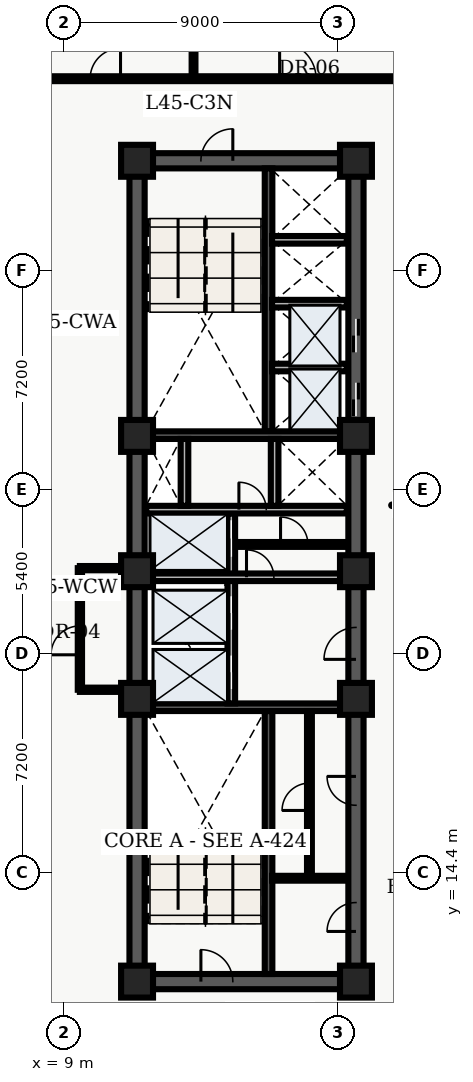
"""IFC4 building model, lengths in metres.
Left out: names, types, materials, properties, quantities, classifications, styles, units other than length and angle.
Written with IfcOpenShell. Run it as: python <this file> out.ifc"""

import sys

from ifc_helpers import new_model, entity, si_unit, converted_unit, direction, frame, origin_with_axes, origin_2d_with_axis, place, context, subcontext, project, spatial, polyline, rectangle, outline, extrude, element, fill, save


model = new_model("IFC4")
c1 = context("Model", 3, precision=1e-05, world=origin_with_axes(), true_north=direction((0.0, 1.0)))
c2 = subcontext(c1, "Body", "Model", "MODEL_VIEW")
j1 = project(units=[si_unit("LENGTHUNIT", "METRE"), converted_unit("PLANEANGLEUNIT", "DEGREE", entity("IfcPlaneAngleMeasure", 0.017), si_unit("PLANEANGLEUNIT", "RADIAN"), dimensions=[0, 0, 0, 0, 0, 0, 0])], contexts=[c1])
p1 = place(None, origin_with_axes())
s1 = spatial("IfcSite", under=j1, at=p1, CompositionType="ELEMENT")
p2 = place(p1, origin_with_axes())
s2 = spatial("IfcBuilding", under=s1, at=p2, CompositionType="ELEMENT")
p3 = place(p2, frame((0.0, 0.0, 183.6), z_axis=(0.0, 0.0, 1.0), x_axis=(1.0, 0.0, 0.0)))
s3 = spatial("IfcBuildingStorey", under=s2, at=p3, CompositionType="ELEMENT", Elevation=183.6)
p4 = place(p3, frame((11.4, 10.8, 0.0), z_axis=(0.0, 0.0, 1.0), x_axis=(0.0, 1.0, 0.0)))
e1 = element("IfcWall", 1, at=p4, inside=s3, PredefinedType="SHEAR", context=c2, shape_type="SweptSolid", body=[
    extrude(outline(polyline([(0.0, -0.25), (27.0, -0.25), (27.0, 0.25), (0.0, 0.25), (0.0, -0.25)])), origin_with_axes(), (0.0, 0.0, 1.0), 3.6),
])
p5 = place(p3, frame((11.4, 10.8, 0.0), z_axis=(0.0, 0.0, 1.0), x_axis=(1.0, 0.0, 0.0)))
e2 = element("IfcWall", 2, at=p5, inside=s3, PredefinedType="SHEAR", context=c2, shape_type="SweptSolid", body=[
    extrude(outline(polyline([(0.0, -0.25), (7.2, -0.25), (7.2, 0.25), (0.0, 0.25), (0.0, -0.25)])), origin_with_axes(), (0.0, 0.0, 1.0), 3.6),
])
p6 = place(p5, frame((2.625, 0.0, 0.0), z_axis=(0.0, 0.0, 1.0), x_axis=(1.0, 0.0, 0.0)))
e3 = element("IfcOpeningElement", 3, at=p6, cuts=e2, PredefinedType="OPENING", context=c2, shape_type="SweptSolid", body=[
    extrude(rectangle(XDim=1.05, YDim=0.52, at=origin_2d_with_axis()), origin_with_axes(), (0.0, 0.0, 1.0), 2.15),
])
p7 = place(p3, frame((11.4, 37.8, 0.0), z_axis=(0.0, 0.0, 1.0), x_axis=(1.0, 0.0, 0.0)))
e4 = element("IfcWall", 4, at=p7, inside=s3, PredefinedType="SHEAR", context=c2, shape_type="SweptSolid", body=[
    extrude(outline(polyline([(0.0, -0.25), (7.2, -0.25), (7.2, 0.25), (0.0, 0.25), (0.0, -0.25)])), origin_with_axes(), (0.0, 0.0, 1.0), 3.6),
])
p8 = place(p7, frame((2.625, 0.0, 0.0), z_axis=(0.0, 0.0, 1.0), x_axis=(1.0, 0.0, 0.0)))
e5 = element("IfcOpeningElement", 5, at=p8, cuts=e4, PredefinedType="OPENING", context=c2, shape_type="SweptSolid", body=[
    extrude(rectangle(XDim=1.05, YDim=0.52, at=origin_2d_with_axis()), origin_with_axes(), (0.0, 0.0, 1.0), 2.15),
])
p9 = place(p3, frame((18.6, 10.8, 0.0), z_axis=(0.0, 0.0, 1.0), x_axis=(0.0, 1.0, 0.0)))
e6 = element("IfcWall", 6, at=p9, inside=s3, PredefinedType="SHEAR", context=c2, shape_type="SweptSolid", body=[
    extrude(outline(polyline([(0.0, -0.25), (13.5, -0.25), (13.5, 0.25), (0.0, 0.25), (0.0, -0.25)])), origin_with_axes(), (0.0, 0.0, 1.0), 3.6),
])
p10 = place(p9, frame((11.125, 0.0, 0.0), z_axis=(0.0, 0.0, 1.0), x_axis=(1.0, 0.0, 0.0)))
e7 = element("IfcOpeningElement", 7, at=p10, cuts=e6, PredefinedType="OPENING", context=c2, shape_type="SweptSolid", body=[
    extrude(rectangle(XDim=1.05, YDim=0.52, at=origin_2d_with_axis()), origin_with_axes(), (0.0, 0.0, 1.0), 2.15),
])
p11 = place(p9, frame((2.125, 0.0, 0.0), z_axis=(0.0, 0.0, 1.0), x_axis=(1.0, 0.0, 0.0)))
e8 = element("IfcOpeningElement", 8, at=p11, cuts=e6, PredefinedType="OPENING", context=c2, shape_type="SweptSolid", body=[
    extrude(rectangle(XDim=0.95, YDim=0.52, at=origin_2d_with_axis()), origin_with_axes(), (0.0, 0.0, 1.0), 2.15),
])
p12 = place(p9, frame((6.275, 0.0, 0.0), z_axis=(0.0, 0.0, 1.0), x_axis=(1.0, 0.0, 0.0)))
e9 = element("IfcOpeningElement", 9, at=p12, cuts=e6, PredefinedType="OPENING", context=c2, shape_type="SweptSolid", body=[
    extrude(rectangle(XDim=0.95, YDim=0.52, at=origin_2d_with_axis()), origin_with_axes(), (0.0, 0.0, 1.0), 2.15),
])
p13 = place(p3, frame((18.6, 24.3, 0.0), z_axis=(0.0, 0.0, 1.0), x_axis=(0.0, 1.0, 0.0)))
e10 = element("IfcWall", 10, at=p13, inside=s3, PredefinedType="SHEAR", context=c2, shape_type="SweptSolid", body=[
    extrude(outline(polyline([(0.0, -0.25), (13.5, -0.25), (13.5, 0.25), (0.0, 0.25), (0.0, -0.25)])), origin_with_axes(), (0.0, 0.0, 1.0), 3.6),
])
p14 = place(p13, frame((5.65, 0.0, 0.0), z_axis=(0.0, 0.0, 1.0), x_axis=(1.0, 0.0, 0.0)))
e11 = element("IfcOpeningElement", 11, at=p14, cuts=e10, PredefinedType="OPENING", context=c2, shape_type="SweptSolid", body=[
    extrude(rectangle(XDim=1.1, YDim=0.52, at=origin_2d_with_axis()), origin_with_axes(), (0.0, 0.0, 1.0), 2.15),
])
p15 = place(p13, frame((7.75, 0.0, 0.0), z_axis=(0.0, 0.0, 1.0), x_axis=(1.0, 0.0, 0.0)))
e12 = element("IfcOpeningElement", 12, at=p15, cuts=e10, PredefinedType="OPENING", context=c2, shape_type="SweptSolid", body=[
    extrude(rectangle(XDim=1.1, YDim=0.52, at=origin_2d_with_axis()), origin_with_axes(), (0.0, 0.0, 1.0), 2.15),
])
p16 = place(p3, frame((15.725, 11.05, 0.0), z_axis=(0.0, 0.0, 1.0), x_axis=(0.0, 1.0, 0.0)))
e13 = element("IfcWall", 13, at=p16, inside=s3, PredefinedType="SHEAR", context=c2, shape_type="SweptSolid", body=[
    extrude(outline(polyline([(0.0, -0.125), (8.65, -0.125), (8.65, 0.125), (0.0, 0.125), (0.0, -0.125)])), origin_with_axes(), (0.0, 0.0, 1.0), 3.6),
])
p17 = place(p3, frame((11.65, 19.825, 0.0), z_axis=(0.0, 0.0, 1.0), x_axis=(1.0, 0.0, 0.0)))
e14 = element("IfcWall", 14, at=p17, inside=s3, PredefinedType="SHEAR", context=c2, shape_type="SweptSolid", body=[
    extrude(outline(polyline([(0.0, -0.125), (6.7, -0.125), (6.7, 0.125), (0.0, 0.125), (0.0, -0.125)])), origin_with_axes(), (0.0, 0.0, 1.0), 3.6),
])
p18 = place(p3, frame((15.725, 28.9, 0.0), z_axis=(0.0, 0.0, 1.0), x_axis=(0.0, 1.0, 0.0)))
e15 = element("IfcWall", 15, at=p18, inside=s3, PredefinedType="SHEAR", context=c2, shape_type="SweptSolid", body=[
    extrude(outline(polyline([(0.0, -0.125), (8.65, -0.125), (8.65, 0.125), (0.0, 0.125), (0.0, -0.125)])), origin_with_axes(), (0.0, 0.0, 1.0), 3.6),
])
p19 = place(p3, frame((11.65, 28.775, 0.0), z_axis=(0.0, 0.0, 1.0), x_axis=(1.0, 0.0, 0.0)))
e16 = element("IfcWall", 16, at=p19, inside=s3, PredefinedType="SHEAR", context=c2, shape_type="SweptSolid", body=[
    extrude(outline(polyline([(0.0, -0.125), (6.7, -0.125), (6.7, 0.125), (0.0, 0.125), (0.0, -0.125)])), origin_with_axes(), (0.0, 0.0, 1.0), 3.6),
])
p20 = place(p3, frame((14.5, 19.95, 0.0), z_axis=(0.0, 0.0, 1.0), x_axis=(0.0, 1.0, 0.0)))
e17 = element("IfcWall", 17, at=p20, inside=s3, PredefinedType="SOLIDWALL", context=c2, shape_type="SweptSolid", body=[
    extrude(outline(polyline([(0.0, -0.125), (6.25, -0.125), (6.25, 0.125), (0.0, 0.125), (0.0, -0.125)])), origin_with_axes(), (0.0, 0.0, 1.0), 2.64),
])
p21 = place(p20, frame((1.025, 0.0, 0.0), z_axis=(0.0, 0.0, 1.0), x_axis=(1.0, 0.0, 0.0)))
e18 = element("IfcOpeningElement", 18, at=p21, cuts=e17, PredefinedType="OPENING", context=c2, shape_type="SweptSolid", body=[
    extrude(rectangle(XDim=1.1, YDim=0.27, at=origin_2d_with_axis()), origin_with_axes(), (0.0, 0.0, 1.0), 2.15),
])
p22 = place(p20, frame((2.975, 0.0, 0.0), z_axis=(0.0, 0.0, 1.0), x_axis=(1.0, 0.0, 0.0)))
e19 = element("IfcOpeningElement", 19, at=p22, cuts=e17, PredefinedType="OPENING", context=c2, shape_type="SweptSolid", body=[
    extrude(rectangle(XDim=1.1, YDim=0.27, at=origin_2d_with_axis()), origin_with_axes(), (0.0, 0.0, 1.0), 2.15),
])
p23 = place(p20, frame((5.425, 0.0, 0.0), z_axis=(0.0, 0.0, 1.0), x_axis=(1.0, 0.0, 0.0)))
e20 = element("IfcOpeningElement", 20, at=p23, cuts=e17, PredefinedType="OPENING", context=c2, shape_type="SweptSolid", body=[
    extrude(rectangle(XDim=1.2, YDim=0.27, at=origin_2d_with_axis()), origin_with_axes(), (0.0, 0.0, 1.0), 2.15),
])
p24 = place(p3, frame((11.7, 24.1, 0.0), z_axis=(0.0, 0.0, 1.0), x_axis=(1.0, 0.0, 0.0)))
e21 = element("IfcWall", 21, at=p24, inside=s3, PredefinedType="SOLIDWALL", context=c2, shape_type="SweptSolid", body=[
    extrude(outline(polyline([(0.0, -0.125), (6.6, -0.125), (6.6, 0.125), (0.0, 0.125), (0.0, -0.125)])), origin_with_axes(), (0.0, 0.0, 1.0), 2.64),
])
p25 = place(p24, frame((3.75, 0.0, 0.0), z_axis=(0.0, 0.0, 1.0), x_axis=(1.0, 0.0, 0.0)))
e22 = element("IfcOpeningElement", 22, at=p25, cuts=e21, PredefinedType="OPENING", context=c2, shape_type="SweptSolid", body=[
    extrude(rectangle(XDim=0.9, YDim=0.27, at=origin_2d_with_axis()), origin_with_axes(), (0.0, 0.0, 1.0), 2.15),
])
p26 = place(p3, frame((11.7, 26.325, 0.0), z_axis=(0.0, 0.0, 1.0), x_axis=(1.0, 0.0, 0.0)))
e23 = element("IfcWall", 23, at=p26, inside=s3, PredefinedType="SOLIDWALL", context=c2, shape_type="SweptSolid", body=[
    extrude(outline(polyline([(0.0, -0.125), (6.6, -0.125), (6.6, 0.125), (0.0, 0.125), (0.0, -0.125)])), origin_with_axes(), (0.0, 0.0, 1.0), 2.64),
])
p27 = place(p26, frame((3.5, 0.0, 0.0), z_axis=(0.0, 0.0, 1.0), x_axis=(1.0, 0.0, 0.0)))
e24 = element("IfcOpeningElement", 24, at=p27, cuts=e23, PredefinedType="OPENING", context=c2, shape_type="SweptSolid", body=[
    extrude(rectangle(XDim=0.9, YDim=0.27, at=origin_2d_with_axis()), origin_with_axes(), (0.0, 0.0, 1.0), 2.15),
])
for number, where, z_axis, x_axis in (
    (25, (12.96, 26.45, 0.0), (0.0, 0.0, 1.0), (0.0, 1.0, 0.0)),
    (26, (15.925, 26.45, 0.0), (0.0, 0.0, 1.0), (0.0, 1.0, 0.0)),
):
    element("IfcWall", number, at=place(p3, frame(where, z_axis=z_axis, x_axis=x_axis)), inside=s3, PredefinedType="SOLIDWALL", context=c2, shape_type="SweptSolid", body=[
        extrude(outline(polyline([(0.0, -0.125), (2.2, -0.125), (2.2, 0.125), (0.0, 0.125), (0.0, -0.125)])), origin_with_axes(), (0.0, 0.0, 1.0), 2.64),
    ])
for number, where, z_axis, x_axis in (
    (27, (11.4, 10.8, 0.0), (0.0, 0.0, 1.0), (1.0, 0.0, 0.0)),
    (28, (11.4, 20.1, 0.0), (0.0, 0.0, 1.0), (1.0, 0.0, 0.0)),
    (29, (11.4, 24.3, 0.0), (0.0, 0.0, 1.0), (1.0, 0.0, 0.0)),
    (30, (11.4, 28.75, 0.0), (0.0, 0.0, 1.0), (1.0, 0.0, 0.0)),
    (31, (11.4, 37.8, 0.0), (0.0, 0.0, 1.0), (1.0, 0.0, 0.0)),
    (32, (18.6, 10.8, 0.0), (0.0, 0.0, 1.0), (1.0, 0.0, 0.0)),
    (33, (18.6, 20.1, 0.0), (0.0, 0.0, 1.0), (1.0, 0.0, 0.0)),
    (34, (18.6, 24.3, 0.0), (0.0, 0.0, 1.0), (1.0, 0.0, 0.0)),
    (35, (18.6, 28.75, 0.0), (0.0, 0.0, 1.0), (1.0, 0.0, 0.0)),
    (36, (18.6, 37.8, 0.0), (0.0, 0.0, 1.0), (1.0, 0.0, 0.0)),
):
    element("IfcColumn", number, at=place(p3, frame(where, z_axis=z_axis, x_axis=x_axis)), inside=s3, PredefinedType="COLUMN", context=c2, shape_type="SweptSolid", body=[
        extrude(rectangle(XDim=1.05, YDim=1.05, at=origin_2d_with_axis()), origin_with_axes(), (0.0, 0.0, 1.0), 3.9),
    ])
p28 = place(p3, frame((14.62, 25.18, 0.0), z_axis=(0.0, 0.0, 1.0), x_axis=(1.0, 0.0, 0.0)))
e37 = element("IfcWall", 37, at=p28, inside=s3, PredefinedType="PARTITIONING", context=c2, shape_type="SweptSolid", body=[
    extrude(outline(polyline([(0.0, -0.08), (3.68, -0.08), (3.68, 0.08), (0.0, 0.08), (0.0, -0.08)])), origin_with_axes(), (0.0, 0.0, 1.0), 2.64),
])
p29 = place(p28, frame((1.95, 0.0, 0.0), z_axis=(0.0, 0.0, 1.0), x_axis=(1.0, 0.0, 0.0)))
e38 = element("IfcOpeningElement", 38, at=p29, cuts=e37, PredefinedType="OPENING", context=c2, shape_type="SweptSolid", body=[
    extrude(rectangle(XDim=0.9, YDim=0.18, at=origin_2d_with_axis()), origin_with_axes(), (0.0, 0.0, 1.0), 2.15),
])
p30 = place(p3, frame((15.84, 14.2, 0.0), z_axis=(0.0, 0.0, 1.0), x_axis=(1.0, 0.0, 0.0)))
e39 = element("IfcWall", 39, at=p30, inside=s3, PredefinedType="PARTITIONING", context=c2, shape_type="SweptSolid", body=[
    extrude(outline(polyline([(0.0, -0.08), (2.46, -0.08), (2.46, 0.08), (0.0, 0.08), (0.0, -0.08)])), origin_with_axes(), (0.0, 0.0, 1.0), 2.64),
])
p31 = place(p3, frame((17.07, 14.28, 0.0), z_axis=(0.0, 0.0, 1.0), x_axis=(0.0, 1.0, 0.0)))
e40 = element("IfcWall", 40, at=p31, inside=s3, PredefinedType="PARTITIONING", context=c2, shape_type="SweptSolid", body=[
    extrude(outline(polyline([(0.0, -0.08), (5.42, -0.08), (5.42, 0.08), (0.0, 0.08), (0.0, -0.08)])), origin_with_axes(), (0.0, 0.0, 1.0), 2.64),
])
p32 = place(p31, frame((2.6, 0.0, 0.0), z_axis=(0.0, 0.0, 1.0), x_axis=(1.0, 0.0, 0.0)))
e41 = element("IfcOpeningElement", 41, at=p32, cuts=e40, PredefinedType="OPENING", context=c2, shape_type="SweptSolid", body=[
    extrude(rectangle(XDim=0.9, YDim=0.18, at=origin_2d_with_axis()), origin_with_axes(), (0.0, 0.0, 1.0), 2.15),
])
for number, where, z_axis, x_axis in (
    (42, (15.84, 31.0, 0.0), (0.0, 0.0, 1.0), (1.0, 0.0, 0.0)),
    (43, (15.84, 33.1, 0.0), (0.0, 0.0, 1.0), (1.0, 0.0, 0.0)),
    (44, (15.84, 35.2, 0.0), (0.0, 0.0, 1.0), (1.0, 0.0, 0.0)),
):
    element("IfcWall", number, at=place(p3, frame(where, z_axis=z_axis, x_axis=x_axis)), inside=s3, PredefinedType="SOLIDWALL", context=c2, shape_type="SweptSolid", body=[
        extrude(outline(polyline([(0.0, -0.125), (2.46, -0.125), (2.46, 0.125), (0.0, 0.125), (0.0, -0.125)])), origin_with_axes(), (0.0, 0.0, 1.0), 2.64),
    ])
p33 = place(p3, frame((9.52, 20.4, 0.0), z_axis=(0.0, 0.0, 1.0), x_axis=(0.0, 1.0, 0.0)))
e45 = element("IfcWall", 45, at=p33, inside=s3, PredefinedType="PARTITIONING", context=c2, shape_type="SweptSolid", body=[
    extrude(outline(polyline([(0.0, -0.07), (4.0, -0.07), (4.0, 0.07), (0.0, 0.07), (0.0, -0.07)])), origin_with_axes(), (0.0, 0.0, 1.0), 2.64),
])
p34 = place(p33, frame((1.625, 0.0, 0.0), z_axis=(0.0, 0.0, 1.0), x_axis=(1.0, 0.0, 0.0)))
e46 = element("IfcOpeningElement", 46, at=p34, cuts=e45, PredefinedType="OPENING", context=c2, shape_type="SweptSolid", body=[
    extrude(rectangle(XDim=0.95, YDim=0.16, at=origin_2d_with_axis()), origin_with_axes(), (0.0, 0.0, 1.0), 2.15),
])
for number, where, z_axis, x_axis in (
    (47, (9.52, 20.4, 0.0), (0.0, 0.0, 1.0), (1.0, 0.0, 0.0)),
    (48, (9.52, 24.4, 0.0), (0.0, 0.0, 1.0), (1.0, 0.0, 0.0)),
):
    element("IfcWall", number, at=place(p3, frame(where, z_axis=z_axis, x_axis=x_axis)), inside=s3, PredefinedType="PARTITIONING", context=c2, shape_type="SweptSolid", body=[
        extrude(outline(polyline([(0.0, -0.07), (1.58, -0.07), (1.58, 0.07), (0.0, 0.07), (0.0, -0.07)])), origin_with_axes(), (0.0, 0.0, 1.0), 2.64),
    ])
p35 = place(p3, frame((2.6, 40.5, 0.0), z_axis=(0.0, 0.0, 1.0), x_axis=(1.0, 0.0, 0.0)))
e49 = element("IfcWall", 49, at=p35, inside=s3, PredefinedType="PARTITIONING", context=c2, shape_type="SweptSolid", body=[
    extrude(outline(polyline([(0.0, -0.08), (23.459, -0.08), (23.459, 0.08), (0.0, 0.08), (0.0, -0.08)])), origin_with_axes(), (0.0, 0.0, 1.0), 2.64),
])
p36 = place(p35, frame((2.422, 0.0, 0.0), z_axis=(0.0, 0.0, 1.0), x_axis=(1.0, 0.0, 0.0)))
e50 = element("IfcOpeningElement", 50, at=p36, cuts=e49, PredefinedType="OPENING", context=c2, shape_type="SweptSolid", body=[
    extrude(rectangle(XDim=1.0, YDim=0.18, at=origin_2d_with_axis()), origin_with_axes(), (0.0, 0.0, 1.0), 2.15),
])
p37 = place(p35, frame((7.756, 0.0, 0.0), z_axis=(0.0, 0.0, 1.0), x_axis=(1.0, 0.0, 0.0)))
e51 = element("IfcOpeningElement", 51, at=p37, cuts=e49, PredefinedType="OPENING", context=c2, shape_type="SweptSolid", body=[
    extrude(rectangle(XDim=1.0, YDim=0.18, at=origin_2d_with_axis()), origin_with_axes(), (0.0, 0.0, 1.0), 2.15),
])
p38 = place(p35, frame((14.089, 0.0, 0.0), z_axis=(0.0, 0.0, 1.0), x_axis=(1.0, 0.0, 0.0)))
e52 = element("IfcOpeningElement", 52, at=p38, cuts=e49, PredefinedType="OPENING", context=c2, shape_type="SweptSolid", body=[
    extrude(rectangle(XDim=1.2, YDim=0.18, at=origin_2d_with_axis()), origin_with_axes(), (0.0, 0.0, 1.0), 2.2),
])
p39 = place(p3, frame((13.258, 40.6, 0.0), z_axis=(0.0, 0.0, 1.0), x_axis=(0.0, 1.0, 0.0)))
e53 = element("IfcWall", 53, at=p39, inside=s3, PredefinedType="PARTITIONING", context=c2, shape_type="SweptSolid", body=[
    extrude(outline(polyline([(0.0, -0.062), (7.665, -0.062), (7.665, 0.062), (0.0, 0.062), (0.0, -0.062)])), origin_with_axes(), (0.0, 0.0, 1.0), 2.64),
])
p40 = place(p13, frame((5.65, 0.0, 0.0), z_axis=(0.0, 0.0, 1.0), x_axis=(1.0, 0.0, 0.0)))
e54 = element("IfcDoor", 54, at=p40, inside=s3, OperationType="SLIDING_TO_LEFT", PredefinedType="DOOR", context=c2, shape_type="SweptSolid", body=[
    extrude(rectangle(XDim=1.1, YDim=0.09, at=origin_2d_with_axis()), origin_with_axes(), (0.0, 0.0, 1.0), 2.15),
])
fill(e11, e54)
p41 = place(p13, frame((7.75, 0.0, 0.0), z_axis=(0.0, 0.0, 1.0), x_axis=(1.0, 0.0, 0.0)))
e55 = element("IfcDoor", 55, at=p41, inside=s3, OperationType="SLIDING_TO_RIGHT", PredefinedType="DOOR", context=c2, shape_type="SweptSolid", body=[
    extrude(rectangle(XDim=1.1, YDim=0.09, at=origin_2d_with_axis()), origin_with_axes(), (0.0, 0.0, 1.0), 2.15),
])
fill(e12, e55)
p42 = place(p20, frame((1.025, 0.0, 0.0), z_axis=(0.0, 0.0, 1.0), x_axis=(1.0, 0.0, 0.0)))
e56 = element("IfcDoor", 56, at=p42, inside=s3, OperationType="SLIDING_TO_LEFT", PredefinedType="DOOR", context=c2, shape_type="SweptSolid", body=[
    extrude(rectangle(XDim=1.1, YDim=0.09, at=origin_2d_with_axis()), origin_with_axes(), (0.0, 0.0, 1.0), 2.15),
])
fill(e18, e56)
p43 = place(p20, frame((2.975, 0.0, 0.0), z_axis=(0.0, 0.0, 1.0), x_axis=(1.0, 0.0, 0.0)))
e57 = element("IfcDoor", 57, at=p43, inside=s3, OperationType="SLIDING_TO_RIGHT", PredefinedType="DOOR", context=c2, shape_type="SweptSolid", body=[
    extrude(rectangle(XDim=1.1, YDim=0.09, at=origin_2d_with_axis()), origin_with_axes(), (0.0, 0.0, 1.0), 2.15),
])
fill(e19, e57)
p44 = place(p20, frame((5.425, 0.0, 0.0), z_axis=(0.0, 0.0, 1.0), x_axis=(1.0, 0.0, 0.0)))
e58 = element("IfcDoor", 58, at=p44, inside=s3, OperationType="DOUBLE_DOOR_SLIDING", PredefinedType="DOOR", context=c2, shape_type="SweptSolid", body=[
    extrude(rectangle(XDim=1.2, YDim=0.09, at=origin_2d_with_axis()), origin_with_axes(), (0.0, 0.0, 1.0), 2.15),
])
fill(e20, e58)
p45 = place(p5, frame((2.625, 0.0, 0.0), z_axis=(0.0, 0.0, 1.0), x_axis=(1.0, 0.0, 0.0)))
e59 = element("IfcDoor", 59, at=p45, inside=s3, OperationType="SINGLE_SWING_LEFT", PredefinedType="DOOR", context=c2, shape_type="SweptSolid", body=[
    extrude(rectangle(XDim=1.05, YDim=0.09, at=origin_2d_with_axis()), origin_with_axes(), (0.0, 0.0, 1.0), 2.15),
])
fill(e3, e59)
p46 = place(p7, frame((2.625, 0.0, 0.0), z_axis=(0.0, 0.0, 1.0), x_axis=(1.0, 0.0, 0.0)))
e60 = element("IfcDoor", 60, at=p46, inside=s3, OperationType="SINGLE_SWING_RIGHT", PredefinedType="DOOR", context=c2, shape_type="SweptSolid", body=[
    extrude(rectangle(XDim=1.05, YDim=0.09, at=origin_2d_with_axis()), origin_with_axes(), (0.0, 0.0, 1.0), 2.15),
])
fill(e5, e60)
p47 = place(p9, frame((11.125, 0.0, 0.0), z_axis=(0.0, 0.0, 1.0), x_axis=(1.0, 0.0, 0.0)))
e61 = element("IfcDoor", 61, at=p47, inside=s3, OperationType="SINGLE_SWING_LEFT", PredefinedType="DOOR", context=c2, shape_type="SweptSolid", body=[
    extrude(rectangle(XDim=1.05, YDim=0.09, at=origin_2d_with_axis()), origin_with_axes(), (0.0, 0.0, 1.0), 2.15),
])
fill(e7, e61)
p48 = place(p26, frame((3.5, 0.0, 0.0), z_axis=(0.0, 0.0, 1.0), x_axis=(1.0, 0.0, 0.0)))
e62 = element("IfcDoor", 62, at=p48, inside=s3, OperationType="SINGLE_SWING_LEFT", PredefinedType="DOOR", context=c2, shape_type="SweptSolid", body=[
    extrude(rectangle(XDim=0.9, YDim=0.09, at=origin_2d_with_axis()), origin_with_axes(), (0.0, 0.0, 1.0), 2.15),
])
fill(e24, e62)
p49 = place(p24, frame((3.75, 0.0, 0.0), z_axis=(0.0, 0.0, 1.0), x_axis=(1.0, 0.0, 0.0)))
e63 = element("IfcDoor", 63, at=p49, inside=s3, OperationType="SINGLE_SWING_LEFT", PredefinedType="DOOR", context=c2, shape_type="SweptSolid", body=[
    extrude(rectangle(XDim=0.9, YDim=0.09, at=origin_2d_with_axis()), origin_with_axes(), (0.0, 0.0, 1.0), 2.15),
])
fill(e22, e63)
p50 = place(p28, frame((1.95, 0.0, 0.0), z_axis=(0.0, 0.0, 1.0), x_axis=(1.0, 0.0, 0.0)))
e64 = element("IfcDoor", 64, at=p50, inside=s3, OperationType="SINGLE_SWING_LEFT", PredefinedType="DOOR", context=c2, shape_type="SweptSolid", body=[
    extrude(rectangle(XDim=0.9, YDim=0.09, at=origin_2d_with_axis()), origin_with_axes(), (0.0, 0.0, 1.0), 2.15),
])
fill(e38, e64)
p51 = place(p9, frame((2.125, 0.0, 0.0), z_axis=(0.0, 0.0, 1.0), x_axis=(1.0, 0.0, 0.0)))
e65 = element("IfcDoor", 65, at=p51, inside=s3, OperationType="SINGLE_SWING_LEFT", PredefinedType="DOOR", context=c2, shape_type="SweptSolid", body=[
    extrude(rectangle(XDim=0.95, YDim=0.09, at=origin_2d_with_axis()), origin_with_axes(), (0.0, 0.0, 1.0), 2.15),
])
fill(e8, e65)
p52 = place(p31, frame((2.6, 0.0, 0.0), z_axis=(0.0, 0.0, 1.0), x_axis=(1.0, 0.0, 0.0)))
e66 = element("IfcDoor", 66, at=p52, inside=s3, OperationType="SINGLE_SWING_LEFT", PredefinedType="DOOR", context=c2, shape_type="SweptSolid", body=[
    extrude(rectangle(XDim=0.9, YDim=0.09, at=origin_2d_with_axis()), origin_with_axes(), (0.0, 0.0, 1.0), 2.15),
])
fill(e41, e66)
p53 = place(p9, frame((6.275, 0.0, 0.0), z_axis=(0.0, 0.0, 1.0), x_axis=(1.0, 0.0, 0.0)))
e67 = element("IfcDoor", 67, at=p53, inside=s3, OperationType="SINGLE_SWING_RIGHT", PredefinedType="DOOR", context=c2, shape_type="SweptSolid", body=[
    extrude(rectangle(XDim=0.95, YDim=0.09, at=origin_2d_with_axis()), origin_with_axes(), (0.0, 0.0, 1.0), 2.15),
])
fill(e9, e67)
p54 = place(p33, frame((1.625, 0.0, 0.0), z_axis=(0.0, 0.0, 1.0), x_axis=(1.0, 0.0, 0.0)))
e68 = element("IfcDoor", 68, at=p54, inside=s3, OperationType="SINGLE_SWING_LEFT", PredefinedType="DOOR", context=c2, shape_type="SweptSolid", body=[
    extrude(rectangle(XDim=0.95, YDim=0.084, at=origin_2d_with_axis()), origin_with_axes(), (0.0, 0.0, 1.0), 2.15),
])
fill(e46, e68)
p55 = place(p35, frame((7.756, 0.0, 0.0), z_axis=(0.0, 0.0, 1.0), x_axis=(1.0, 0.0, 0.0)))
e69 = element("IfcDoor", 69, at=p55, inside=s3, OperationType="SINGLE_SWING_RIGHT", PredefinedType="DOOR", context=c2, shape_type="SweptSolid", body=[
    extrude(rectangle(XDim=1.0, YDim=0.09, at=origin_2d_with_axis()), origin_with_axes(), (0.0, 0.0, 1.0), 2.15),
])
fill(e51, e69)
p56 = place(p35, frame((14.089, 0.0, 0.0), z_axis=(0.0, 0.0, 1.0), x_axis=(1.0, 0.0, 0.0)))
e70 = element("IfcDoor", 70, at=p56, inside=s3, OperationType="SINGLE_SWING_LEFT", PredefinedType="DOOR", context=c2, shape_type="SweptSolid", body=[
    extrude(rectangle(XDim=1.2, YDim=0.09, at=origin_2d_with_axis()), origin_with_axes(), (0.0, 0.0, 1.0), 2.2),
])
fill(e52, e70)
save(model, sys.argv[1])
